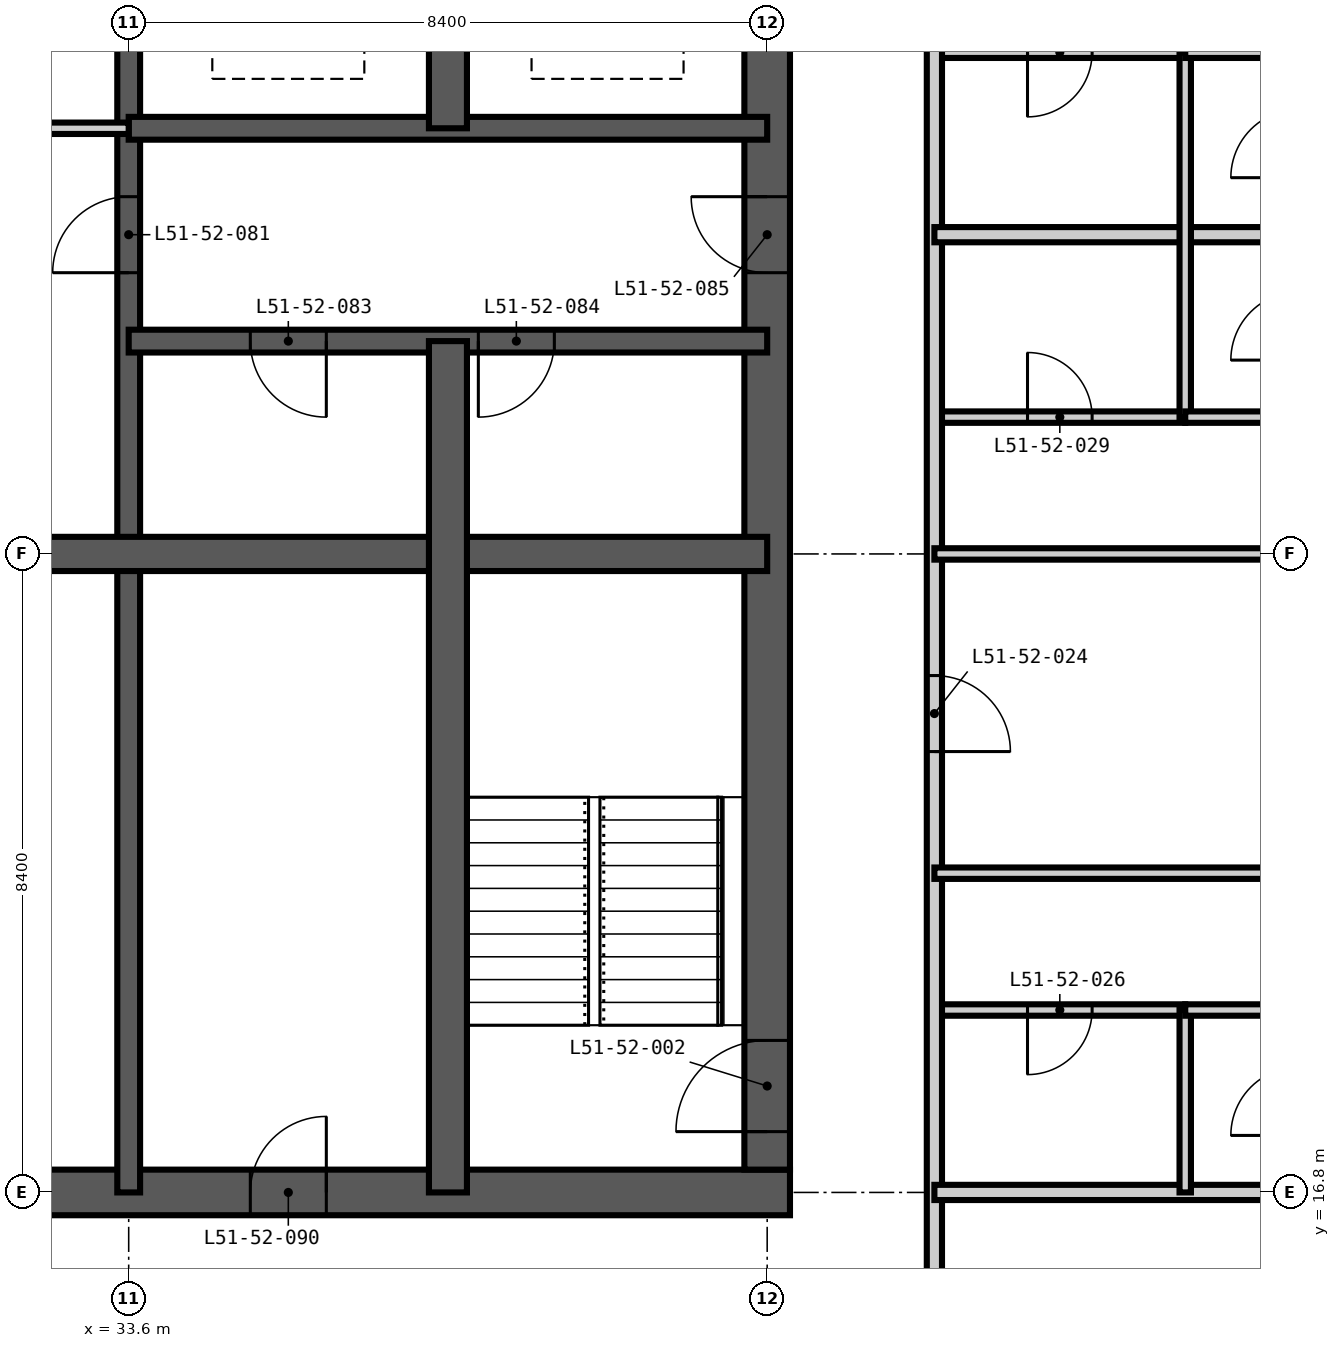
"""IFC4 building model, lengths in metres.
Left out: names, types, materials, properties, quantities, classifications, styles, units other than length and angle.
Written with IfcOpenShell. Run it as: python <this file> out.ifc"""

import sys

from ifc_helpers import new_model, si_unit, direction, frame, frame_2d, origin, place, context, subcontext, project, spatial, rectangle, extrude, element, fill, save


model = new_model("IFC4")
c1 = context("Model", 3, precision=1e-05, world=origin(), true_north=direction((0.0, 1.0)))
c2 = subcontext(c1, "Body", "Model", "MODEL_VIEW")
j1 = project(units=[si_unit("LENGTHUNIT", "METRE"), si_unit("PLANEANGLEUNIT", "RADIAN")], contexts=[c1])
p1 = place(None, origin())
s1 = spatial("IfcSite", under=j1, at=p1, CompositionType="ELEMENT")
p2 = place(p1, origin())
s2 = spatial("IfcBuilding", under=s1, at=p2, CompositionType="ELEMENT")
p3 = place(p2, frame((0.0, 0.0, 198.6)))
s3 = spatial("IfcBuildingStorey", under=s2, at=p3, CompositionType="ELEMENT", Elevation=198.6)
p4 = place(p3, frame((16.5, 16.8, -0.35), z_axis=(0.0, 0.0, 1.0), x_axis=(1.0, 0.0, 0.0)))
e1 = element("IfcWall", 1, at=p4, inside=s3, PredefinedType="SHEAR", context=c2, shape_type="SweptSolid", body=[
    extrude(rectangle(XDim=25.8, YDim=0.6, at=frame_2d((12.9, 0.0))), origin(), (0.0, 0.0, 1.0), 3.6),
])
p5 = place(p4, frame((12.4, 0.0, 0.35)))
e2 = element("IfcOpeningElement", 2, at=p5, cuts=e1, PredefinedType="OPENING", context=c2, shape_type="SweptSolid", body=[
    extrude(rectangle(XDim=1.0, YDim=2.1, at=frame_2d((0.5, 1.05))), frame((0.0, 0.31, 0.0), z_axis=(0.0, -1.0, 0.0), x_axis=(1.0, 0.0, 0.0)), (0.0, 0.0, 1.0), 0.62),
])
p6 = place(p4, frame((18.7, 0.0, 0.35)))
e3 = element("IfcOpeningElement", 3, at=p6, cuts=e1, PredefinedType="OPENING", context=c2, shape_type="SweptSolid", body=[
    extrude(rectangle(XDim=1.0, YDim=2.1, at=frame_2d((0.5, 1.05))), frame((0.0, 0.31, 0.0), z_axis=(0.0, -1.0, 0.0), x_axis=(1.0, 0.0, 0.0)), (0.0, 0.0, 1.0), 0.62),
])
p7 = place(p3, frame((42.0, 17.1, -0.35), z_axis=(0.0, 0.0, 1.0), x_axis=(0.0, 1.0, 0.0)))
e4 = element("IfcWall", 4, at=p7, inside=s3, PredefinedType="SHEAR", context=c2, shape_type="SweptSolid", body=[
    extrude(rectangle(XDim=24.6, YDim=0.6, at=frame_2d((12.3, 0.0))), origin(), (0.0, 0.0, 1.0), 3.6),
])
p8 = place(p7, frame((0.5, 0.0, 0.35)))
e5 = element("IfcOpeningElement", 5, at=p8, cuts=e4, PredefinedType="OPENING", context=c2, shape_type="SweptSolid", body=[
    extrude(rectangle(XDim=1.2, YDim=2.2, at=frame_2d((0.6, 1.1))), frame((0.0, 0.31, 0.0), z_axis=(0.0, -1.0, 0.0), x_axis=(1.0, 0.0, 0.0)), (0.0, 0.0, 1.0), 0.62),
])
p9 = place(p7, frame((11.8, 0.0, 0.35)))
e6 = element("IfcOpeningElement", 6, at=p9, cuts=e4, PredefinedType="OPENING", context=c2, shape_type="SweptSolid", body=[
    extrude(rectangle(XDim=1.0, YDim=2.1, at=frame_2d((0.5, 1.05))), frame((0.0, 0.31, 0.0), z_axis=(0.0, -1.0, 0.0), x_axis=(1.0, 0.0, 0.0)), (0.0, 0.0, 1.0), 0.62),
])
p10 = place(p7, frame((20.2, 0.0, 0.35)))
e7 = element("IfcOpeningElement", 7, at=p10, cuts=e4, PredefinedType="OPENING", context=c2, shape_type="SweptSolid", body=[
    extrude(rectangle(XDim=1.0, YDim=2.1, at=frame_2d((0.5, 1.05))), frame((0.0, 0.31, 0.0), z_axis=(0.0, -1.0, 0.0), x_axis=(1.0, 0.0, 0.0)), (0.0, 0.0, 1.0), 0.62),
])
p11 = place(p3, frame((33.6, 16.8, -0.35), z_axis=(0.0, 0.0, 1.0), x_axis=(0.0, 1.0, 0.0)))
e8 = element("IfcWall", 8, at=p11, inside=s3, PredefinedType="SHEAR", context=c2, shape_type="SweptSolid", body=[
    extrude(rectangle(XDim=25.2, YDim=0.3, at=frame_2d((12.6, 0.0))), origin(), (0.0, 0.0, 1.0), 3.6),
])
p12 = place(p11, frame((22.5, 0.0, 0.35)))
e9 = element("IfcOpeningElement", 9, at=p12, cuts=e8, PredefinedType="OPENING", context=c2, shape_type="SweptSolid", body=[
    extrude(rectangle(XDim=1.2, YDim=2.2, at=frame_2d((0.6, 1.1))), frame((0.0, 0.16, 0.0), z_axis=(0.0, -1.0, 0.0), x_axis=(1.0, 0.0, 0.0)), (0.0, 0.0, 1.0), 0.32),
])
p13 = place(p11, frame((18.3, 0.0, 0.35)))
e10 = element("IfcOpeningElement", 10, at=p13, cuts=e8, PredefinedType="OPENING", context=c2, shape_type="SweptSolid", body=[
    extrude(rectangle(XDim=1.2, YDim=2.2, at=frame_2d((0.6, 1.1))), frame((0.0, 0.16, 0.0), z_axis=(0.0, -1.0, 0.0), x_axis=(1.0, 0.0, 0.0)), (0.0, 0.0, 1.0), 0.32),
])
p14 = place(p11, frame((12.1, 0.0, 0.35)))
e11 = element("IfcOpeningElement", 11, at=p14, cuts=e8, PredefinedType="OPENING", context=c2, shape_type="SweptSolid", body=[
    extrude(rectangle(XDim=1.0, YDim=2.1, at=frame_2d((0.5, 1.05))), frame((0.0, 0.16, 0.0), z_axis=(0.0, -1.0, 0.0), x_axis=(1.0, 0.0, 0.0)), (0.0, 0.0, 1.0), 0.32),
])
p15 = place(p3, frame((33.6, 28.0, -0.35), z_axis=(0.0, 0.0, 1.0), x_axis=(1.0, 0.0, 0.0)))
e12 = element("IfcWall", 12, at=p15, inside=s3, PredefinedType="SHEAR", context=c2, shape_type="SweptSolid", body=[
    extrude(rectangle(XDim=8.4, YDim=0.3, at=frame_2d((4.2, 0.0))), origin(), (0.0, 0.0, 1.0), 3.6),
])
p16 = place(p15, frame((1.6, 0.0, 0.35)))
e13 = element("IfcOpeningElement", 13, at=p16, cuts=e12, PredefinedType="OPENING", context=c2, shape_type="SweptSolid", body=[
    extrude(rectangle(XDim=1.0, YDim=2.1, at=frame_2d((0.5, 1.05))), frame((0.0, 0.16, 0.0), z_axis=(0.0, -1.0, 0.0), x_axis=(1.0, 0.0, 0.0)), (0.0, 0.0, 1.0), 0.32),
])
p17 = place(p15, frame((4.6, 0.0, 0.35)))
e14 = element("IfcOpeningElement", 14, at=p17, cuts=e12, PredefinedType="OPENING", context=c2, shape_type="SweptSolid", body=[
    extrude(rectangle(XDim=1.0, YDim=2.1, at=frame_2d((0.5, 1.05))), frame((0.0, 0.16, 0.0), z_axis=(0.0, -1.0, 0.0), x_axis=(1.0, 0.0, 0.0)), (0.0, 0.0, 1.0), 0.32),
])
p18 = place(p3, frame((33.6, 30.8, -0.35), z_axis=(0.0, 0.0, 1.0), x_axis=(1.0, 0.0, 0.0)))
e15 = element("IfcWall", 15, at=p18, inside=s3, PredefinedType="SHEAR", context=c2, shape_type="SweptSolid", body=[
    extrude(rectangle(XDim=8.4, YDim=0.3, at=frame_2d((4.2, 0.0))), origin(), (0.0, 0.0, 1.0), 3.6),
])
p19 = place(p3, frame((16.8, 25.2, -0.35), z_axis=(0.0, 0.0, 1.0), x_axis=(1.0, 0.0, 0.0)))
e16 = element("IfcWall", 16, at=p19, inside=s3, PredefinedType="SHEAR", context=c2, shape_type="SweptSolid", body=[
    extrude(rectangle(XDim=25.2, YDim=0.45, at=frame_2d((12.6, 0.0))), origin(), (0.0, 0.0, 1.0), 3.6),
])
p20 = place(p3, frame((37.8, 16.8, -0.35), z_axis=(0.0, 0.0, 1.0), x_axis=(0.0, 1.0, 0.0)))
e17 = element("IfcWall", 17, at=p20, inside=s3, PredefinedType="SHEAR", context=c2, shape_type="SweptSolid", body=[
    extrude(rectangle(XDim=11.2, YDim=0.5, at=frame_2d((5.6, 0.0))), origin(), (0.0, 0.0, 1.0), 3.6),
])
p21 = place(p3, frame((37.8, 30.8, -0.35), z_axis=(0.0, 0.0, 1.0), x_axis=(0.0, 1.0, 0.0)))
e18 = element("IfcWall", 18, at=p21, inside=s3, PredefinedType="SHEAR", context=c2, shape_type="SweptSolid", body=[
    extrude(rectangle(XDim=2.8, YDim=0.5, at=frame_2d((1.4, 0.0))), origin(), (0.0, 0.0, 1.0), 3.6),
])
p22 = place(p3, frame((44.2, 19.2, 0.0), z_axis=(0.0, 0.0, 1.0), x_axis=(1.0, 0.0, 0.0)))
e19 = element("IfcWall", 19, at=p22, inside=s3, PredefinedType="PARTITIONING", context=c2, shape_type="SweptSolid", body=[
    extrude(rectangle(XDim=3.3, YDim=0.15, at=frame_2d((1.65, 0.0))), origin(), (0.0, 0.0, 1.0), 3.25),
])
p23 = place(p22, frame((1.225, 0.0, 0.0)))
e20 = element("IfcOpeningElement", 20, at=p23, cuts=e19, PredefinedType="OPENING", context=c2, shape_type="SweptSolid", body=[
    extrude(rectangle(XDim=0.85, YDim=2.1, at=frame_2d((0.425, 1.05))), frame((0.0, 0.085, 0.0), z_axis=(0.0, -1.0, 0.0), x_axis=(1.0, 0.0, 0.0)), (0.0, 0.0, 1.0), 0.17),
])
p24 = place(p3, frame((44.2, 27.0, 0.0), z_axis=(0.0, 0.0, 1.0), x_axis=(1.0, 0.0, 0.0)))
e21 = element("IfcWall", 21, at=p24, inside=s3, PredefinedType="PARTITIONING", context=c2, shape_type="SweptSolid", body=[
    extrude(rectangle(XDim=3.3, YDim=0.15, at=frame_2d((1.65, 0.0))), origin(), (0.0, 0.0, 1.0), 3.25),
])
p25 = place(p24, frame((1.225, 0.0, 0.0)))
e22 = element("IfcOpeningElement", 22, at=p25, cuts=e21, PredefinedType="OPENING", context=c2, shape_type="SweptSolid", body=[
    extrude(rectangle(XDim=0.85, YDim=2.1, at=frame_2d((0.425, 1.05))), frame((0.0, 0.085, 0.0), z_axis=(0.0, -1.0, 0.0), x_axis=(1.0, 0.0, 0.0)), (0.0, 0.0, 1.0), 0.17),
])
p26 = place(p3, frame((44.2, 31.8, 0.0), z_axis=(0.0, 0.0, 1.0), x_axis=(1.0, 0.0, 0.0)))
e23 = element("IfcWall", 23, at=p26, inside=s3, PredefinedType="PARTITIONING", context=c2, shape_type="SweptSolid", body=[
    extrude(rectangle(XDim=3.3, YDim=0.15, at=frame_2d((1.65, 0.0))), origin(), (0.0, 0.0, 1.0), 3.25),
])
p27 = place(p26, frame((1.225, 0.0, 0.0)))
e24 = element("IfcOpeningElement", 24, at=p27, cuts=e23, PredefinedType="OPENING", context=c2, shape_type="SweptSolid", body=[
    extrude(rectangle(XDim=0.85, YDim=2.1, at=frame_2d((0.425, 1.05))), frame((0.0, 0.085, 0.0), z_axis=(0.0, -1.0, 0.0), x_axis=(1.0, 0.0, 0.0)), (0.0, 0.0, 1.0), 0.17),
])
p28 = place(p3, frame((44.2, 44.8, 0.0), z_axis=(0.0, 0.0, 1.0), x_axis=(0.0, -1.0, 0.0)))
e25 = element("IfcWall", 25, at=p28, inside=s3, PredefinedType="PARTITIONING", context=c2, shape_type="SweptSolid", body=[
    extrude(rectangle(XDim=31.4, YDim=0.2, at=frame_2d((15.7, 0.0))), origin(), (0.0, 0.0, 1.0), 3.25),
])
p29 = place(p28, frame((21.2, 0.0, 0.0)))
e26 = element("IfcOpeningElement", 26, at=p29, cuts=e25, PredefinedType="OPENING", context=c2, shape_type="SweptSolid", body=[
    extrude(rectangle(XDim=1.0, YDim=2.2, at=frame_2d((0.5, 1.1))), frame((0.0, 0.11, 0.0), z_axis=(0.0, -1.0, 0.0), x_axis=(1.0, 0.0, 0.0)), (0.0, 0.0, 1.0), 0.22),
])
p30 = place(p28, frame((8.6, 0.0, 0.0)))
e27 = element("IfcOpeningElement", 27, at=p30, cuts=e25, PredefinedType="OPENING", context=c2, shape_type="SweptSolid", body=[
    extrude(rectangle(XDim=1.0, YDim=2.2, at=frame_2d((0.5, 1.1))), frame((0.0, 0.11, 0.0), z_axis=(0.0, -1.0, 0.0), x_axis=(1.0, 0.0, 0.0)), (0.0, 0.0, 1.0), 0.22),
])
p31 = place(p28, frame((29.2, 0.0, 0.0)))
e28 = element("IfcOpeningElement", 28, at=p31, cuts=e25, PredefinedType="OPENING", context=c2, shape_type="SweptSolid", body=[
    extrude(rectangle(XDim=1.0, YDim=2.2, at=frame_2d((0.5, 1.1))), frame((0.0, 0.11, 0.0), z_axis=(0.0, -1.0, 0.0), x_axis=(1.0, 0.0, 0.0)), (0.0, 0.0, 1.0), 0.22),
])
p32 = place(p28, frame((0.9, 0.0, 0.0)))
e29 = element("IfcOpeningElement", 29, at=p32, cuts=e25, PredefinedType="OPENING", context=c2, shape_type="SweptSolid", body=[
    extrude(rectangle(XDim=1.0, YDim=2.2, at=frame_2d((0.5, 1.1))), frame((0.0, 0.11, 0.0), z_axis=(0.0, -1.0, 0.0), x_axis=(1.0, 0.0, 0.0)), (0.0, 0.0, 1.0), 0.22),
])
for number, where, z_axis, x_axis in (
    (30, (44.2, 16.8, 0.0), (0.0, 0.0, 1.0), (1.0, 0.0, 0.0)),
    (31, (44.2, 29.4, 0.0), (0.0, 0.0, 1.0), (1.0, 0.0, 0.0)),
):
    element("IfcWall", number, at=place(p3, frame(where, z_axis=z_axis, x_axis=x_axis)), inside=s3, PredefinedType="PARTITIONING", context=c2, shape_type="SweptSolid", body=[
        extrude(rectangle(XDim=10.418, YDim=0.2, at=frame_2d((5.209, 0.0))), origin(), (0.0, 0.0, 1.0), 3.25),
    ])
p33 = place(p3, frame((47.5, 16.8, 0.0), z_axis=(0.0, 0.0, 1.0), x_axis=(0.0, 1.0, 0.0)))
e32 = element("IfcWall", 32, at=p33, inside=s3, PredefinedType="PARTITIONING", context=c2, shape_type="SweptSolid", body=[
    extrude(rectangle(XDim=2.4, YDim=0.15, at=frame_2d((1.2, 0.0))), origin(), (0.0, 0.0, 1.0), 3.25),
])
p34 = place(p3, frame((47.5, 27.0, 0.0), z_axis=(0.0, 0.0, 1.0), x_axis=(0.0, 1.0, 0.0)))
e33 = element("IfcWall", 33, at=p34, inside=s3, PredefinedType="PARTITIONING", context=c2, shape_type="SweptSolid", body=[
    extrude(rectangle(XDim=4.8, YDim=0.15, at=frame_2d((2.4, 0.0))), origin(), (0.0, 0.0, 1.0), 3.25),
])
p35 = place(p3, frame((47.5, 19.2, 0.0), z_axis=(0.0, 0.0, 1.0), x_axis=(1.0, 0.0, 0.0)))
e34 = element("IfcWall", 34, at=p35, inside=s3, PredefinedType="PARTITIONING", context=c2, shape_type="SweptSolid", body=[
    extrude(rectangle(XDim=1.5, YDim=0.15, at=frame_2d((0.75, 0.0))), origin(), (0.0, 0.0, 1.0), 3.25),
])
p36 = place(p3, frame((44.2, 21.0, 0.0), z_axis=(0.0, 0.0, 1.0), x_axis=(1.0, 0.0, 0.0)))
e35 = element("IfcWall", 35, at=p36, inside=s3, PredefinedType="PARTITIONING", context=c2, shape_type="SweptSolid", body=[
    extrude(rectangle(XDim=10.418, YDim=0.15, at=frame_2d((5.209, 0.0))), origin(), (0.0, 0.0, 1.0), 3.25),
])
p37 = place(p36, frame((4.75, 0.0, 0.0)))
e36 = element("IfcOpeningElement", 36, at=p37, cuts=e35, PredefinedType="OPENING", context=c2, shape_type="SweptSolid", body=[
    extrude(rectangle(XDim=0.9, YDim=2.1, at=frame_2d((0.45, 1.05))), frame((0.0, 0.085, 0.0), z_axis=(0.0, -1.0, 0.0), x_axis=(1.0, 0.0, 0.0)), (0.0, 0.0, 1.0), 0.17),
])
p38 = place(p3, frame((44.2, 25.2, 0.0), z_axis=(0.0, 0.0, 1.0), x_axis=(1.0, 0.0, 0.0)))
e37 = element("IfcWall", 37, at=p38, inside=s3, PredefinedType="PARTITIONING", context=c2, shape_type="SweptSolid", body=[
    extrude(rectangle(XDim=10.418, YDim=0.15, at=frame_2d((5.209, 0.0))), origin(), (0.0, 0.0, 1.0), 3.25),
])
p39 = place(p38, frame((4.75, 0.0, 0.0)))
e38 = element("IfcOpeningElement", 38, at=p39, cuts=e37, PredefinedType="OPENING", context=c2, shape_type="SweptSolid", body=[
    extrude(rectangle(XDim=0.9, YDim=2.1, at=frame_2d((0.45, 1.05))), frame((0.0, 0.085, 0.0), z_axis=(0.0, -1.0, 0.0), x_axis=(1.0, 0.0, 0.0)), (0.0, 0.0, 1.0), 0.17),
])
p40 = place(p3, frame((47.5, 27.0, 0.0), z_axis=(0.0, 0.0, 1.0), x_axis=(1.0, 0.0, 0.0)))
e39 = element("IfcWall", 39, at=p40, inside=s3, PredefinedType="PARTITIONING", context=c2, shape_type="SweptSolid", body=[
    extrude(rectangle(XDim=1.5, YDim=0.15, at=frame_2d((0.75, 0.0))), origin(), (0.0, 0.0, 1.0), 3.25),
])
p41 = place(p3, frame((25.2, 30.8, 0.0), z_axis=(0.0, 0.0, 1.0), x_axis=(1.0, 0.0, 0.0)))
e40 = element("IfcWall", 40, at=p41, inside=s3, PredefinedType="PARTITIONING", context=c2, shape_type="SweptSolid", body=[
    extrude(rectangle(XDim=8.4, YDim=0.15, at=frame_2d((4.2, 0.0))), origin(), (0.0, 0.0, 1.0), 3.25),
])
p42 = place(p41, frame((3.7, 0.0, 0.0)))
e41 = element("IfcOpeningElement", 41, at=p42, cuts=e40, PredefinedType="OPENING", context=c2, shape_type="SweptSolid", body=[
    extrude(rectangle(XDim=1.0, YDim=2.1, at=frame_2d((0.5, 1.05))), frame((0.0, 0.085, 0.0), z_axis=(0.0, -1.0, 0.0), x_axis=(1.0, 0.0, 0.0)), (0.0, 0.0, 1.0), 0.17),
])
p43 = place(p3, frame((47.5, 31.8, 0.0), z_axis=(0.0, 0.0, 1.0), x_axis=(1.0, 0.0, 0.0)))
e42 = element("IfcWall", 42, at=p43, inside=s3, PredefinedType="PARTITIONING", context=c2, shape_type="SweptSolid", body=[
    extrude(rectangle(XDim=1.5, YDim=0.15, at=frame_2d((0.75, 0.0))), origin(), (0.0, 0.0, 1.0), 3.25),
])
p44 = place(p8, origin())
e43 = element("IfcDoor", 43, at=p44, inside=s3, OperationType="SINGLE_SWING_LEFT", PredefinedType="DOOR", context=c2, shape_type="SweptSolid", body=[
    extrude(rectangle(XDim=1.2, YDim=2.2, at=frame_2d((0.6, 1.1))), frame((0.0, 0.025, 0.0), z_axis=(0.0, -1.0, 0.0), x_axis=(1.0, 0.0, 0.0)), (0.0, 0.0, 1.0), 0.05),
])
fill(e5, e43)
p45 = place(p29, origin())
e44 = element("IfcDoor", 44, at=p45, inside=s3, OperationType="SINGLE_SWING_RIGHT", PredefinedType="DOOR", context=c2, shape_type="SweptSolid", body=[
    extrude(rectangle(XDim=1.0, YDim=2.2, at=frame_2d((0.5, 1.1))), frame((0.0, 0.025, 0.0), z_axis=(0.0, -1.0, 0.0), x_axis=(1.0, 0.0, 0.0)), (0.0, 0.0, 1.0), 0.05),
])
fill(e26, e44)
p46 = place(p23, frame((0.85, 0.0, 0.0), z_axis=(0.0, 0.0, 1.0), x_axis=(-1.0, 0.0, 0.0)))
e45 = element("IfcDoor", 45, at=p46, inside=s3, OperationType="SINGLE_SWING_RIGHT", PredefinedType="DOOR", context=c2, shape_type="SweptSolid", body=[
    extrude(rectangle(XDim=0.85, YDim=2.1, at=frame_2d((0.425, 1.05))), frame((0.0, 0.025, 0.0), z_axis=(0.0, -1.0, 0.0), x_axis=(1.0, 0.0, 0.0)), (0.0, 0.0, 1.0), 0.05),
])
fill(e20, e45)
p47 = place(p25, origin())
e46 = element("IfcDoor", 46, at=p47, inside=s3, OperationType="SINGLE_SWING_LEFT", PredefinedType="DOOR", context=c2, shape_type="SweptSolid", body=[
    extrude(rectangle(XDim=0.85, YDim=2.1, at=frame_2d((0.425, 1.05))), frame((0.0, 0.025, 0.0), z_axis=(0.0, -1.0, 0.0), x_axis=(1.0, 0.0, 0.0)), (0.0, 0.0, 1.0), 0.05),
])
fill(e22, e46)
p48 = place(p27, frame((0.85, 0.0, 0.0), z_axis=(0.0, 0.0, 1.0), x_axis=(-1.0, 0.0, 0.0)))
e47 = element("IfcDoor", 47, at=p48, inside=s3, OperationType="SINGLE_SWING_RIGHT", PredefinedType="DOOR", context=c2, shape_type="SweptSolid", body=[
    extrude(rectangle(XDim=0.85, YDim=2.1, at=frame_2d((0.425, 1.05))), frame((0.0, 0.025, 0.0), z_axis=(0.0, -1.0, 0.0), x_axis=(1.0, 0.0, 0.0)), (0.0, 0.0, 1.0), 0.05),
])
fill(e24, e47)
p49 = place(p14, origin())
e48 = element("IfcDoor", 48, at=p49, inside=s3, OperationType="SINGLE_SWING_LEFT", PredefinedType="DOOR", context=c2, shape_type="SweptSolid", body=[
    extrude(rectangle(XDim=1.0, YDim=2.1, at=frame_2d((0.5, 1.05))), frame((0.0, 0.025, 0.0), z_axis=(0.0, -1.0, 0.0), x_axis=(1.0, 0.0, 0.0)), (0.0, 0.0, 1.0), 0.05),
])
fill(e11, e48)
p50 = place(p16, frame((1.0, 0.0, 0.0), z_axis=(0.0, 0.0, 1.0), x_axis=(-1.0, 0.0, 0.0)))
e49 = element("IfcDoor", 49, at=p50, inside=s3, OperationType="SINGLE_SWING_LEFT", PredefinedType="DOOR", context=c2, shape_type="SweptSolid", body=[
    extrude(rectangle(XDim=1.0, YDim=2.1, at=frame_2d((0.5, 1.05))), frame((0.0, 0.025, 0.0), z_axis=(0.0, -1.0, 0.0), x_axis=(1.0, 0.0, 0.0)), (0.0, 0.0, 1.0), 0.05),
])
fill(e13, e49)
p51 = place(p17, frame((1.0, 0.0, 0.0), z_axis=(0.0, 0.0, 1.0), x_axis=(-1.0, 0.0, 0.0)))
e50 = element("IfcDoor", 50, at=p51, inside=s3, OperationType="SINGLE_SWING_RIGHT", PredefinedType="DOOR", context=c2, shape_type="SweptSolid", body=[
    extrude(rectangle(XDim=1.0, YDim=2.1, at=frame_2d((0.5, 1.05))), frame((0.0, 0.025, 0.0), z_axis=(0.0, -1.0, 0.0), x_axis=(1.0, 0.0, 0.0)), (0.0, 0.0, 1.0), 0.05),
])
fill(e14, e50)
p52 = place(p9, origin())
e51 = element("IfcDoor", 51, at=p52, inside=s3, OperationType="SINGLE_SWING_RIGHT", PredefinedType="DOOR", context=c2, shape_type="SweptSolid", body=[
    extrude(rectangle(XDim=1.0, YDim=2.1, at=frame_2d((0.5, 1.05))), frame((0.0, 0.025, 0.0), z_axis=(0.0, -1.0, 0.0), x_axis=(1.0, 0.0, 0.0)), (0.0, 0.0, 1.0), 0.05),
])
fill(e6, e51)
p53 = place(p6, origin())
e52 = element("IfcDoor", 52, at=p53, inside=s3, OperationType="SINGLE_SWING_RIGHT", PredefinedType="DOOR", context=c2, shape_type="SweptSolid", body=[
    extrude(rectangle(XDim=1.0, YDim=2.1, at=frame_2d((0.5, 1.05))), frame((0.0, 0.025, 0.0), z_axis=(0.0, -1.0, 0.0), x_axis=(1.0, 0.0, 0.0)), (0.0, 0.0, 1.0), 0.05),
])
fill(e3, e52)
save(model, sys.argv[1])
